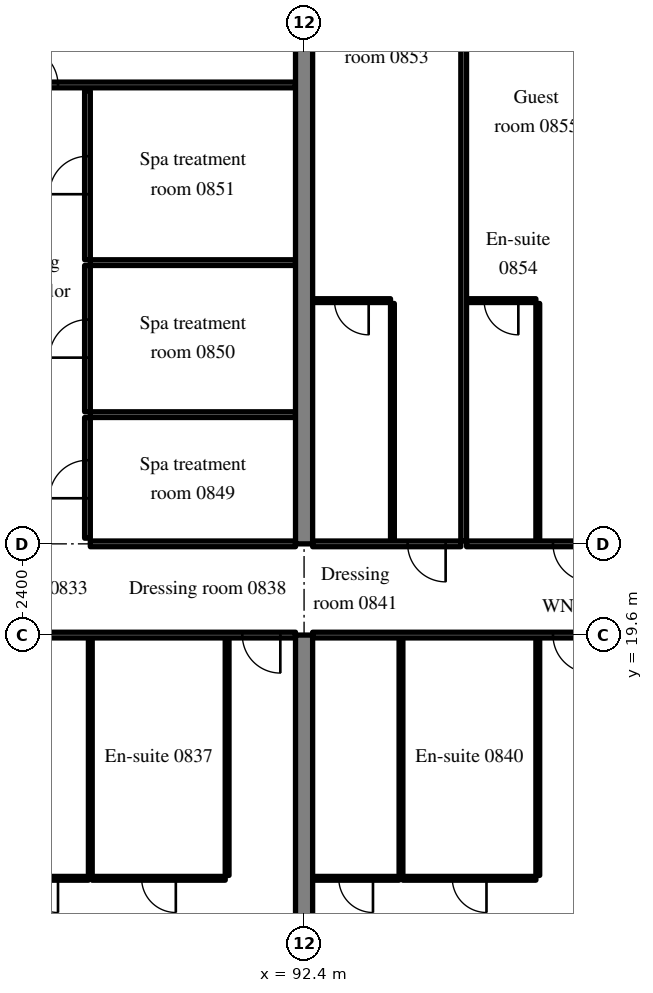
"""IFC4 building model, lengths in metres.
Left out: names, types, materials, properties, quantities, classifications, styles, units other than length and angle.
Written with IfcOpenShell. Run it as: python <this file> out.ifc"""

import sys

from ifc_helpers import new_model, si_unit, direction, frame, frame_2d, origin, place, context, subcontext, project, spatial, rectangle, extrude, source, transform, mapped, element, fill, save


model = new_model("IFC4")
c1 = context("Model", 3, precision=1e-05, world=origin(), true_north=direction((0.0, 1.0)))
c2 = subcontext(c1, "Body", "Model", "MODEL_VIEW")
j1 = project(units=[si_unit("LENGTHUNIT", "METRE"), si_unit("PLANEANGLEUNIT", "RADIAN")], contexts=[c1])
p1 = place(None, origin())
s1 = spatial("IfcSite", under=j1, at=p1, CompositionType="ELEMENT")
p2 = place(p1, origin())
s2 = spatial("IfcBuilding", under=s1, at=p2, CompositionType="ELEMENT")
p3 = place(p2, frame((0.0, 0.0, 39.2)))
s3 = spatial("IfcBuildingStorey", under=s2, at=p3, CompositionType="ELEMENT", Elevation=39.2)
m1 = source(origin(), c2, "Body", "SweptSolid", [
    extrude(rectangle(XDim=19.6, YDim=0.45, at=frame_2d((9.8, 0.0))), origin(), (0.0, 0.0, 1.0), 3.52),
])
p4 = place(p3, frame((92.4, 0.0, 0.0), z_axis=(0.0, 0.0, 1.0), x_axis=(0.0, 1.0, 0.0)))
e1 = element("IfcWall", 1, at=p4, inside=s3, PredefinedType="SHEAR", context=c2, shape_type="MappedRepresentation", body=[
    mapped(m1, transform((0.0, 0.0, 0.0), scale=1.0)),
])
m2 = source(origin(), c2, "Body", "SweptSolid", [
    extrude(rectangle(XDim=20.0, YDim=0.45, at=frame_2d((10.0, 0.0))), origin(), (0.0, 0.0, 1.0), 3.52),
])
p5 = place(p3, frame((92.4, 22.0, 0.0), z_axis=(0.0, 0.0, 1.0), x_axis=(0.0, 1.0, 0.0)))
e2 = element("IfcWall", 2, at=p5, inside=s3, PredefinedType="SHEAR", context=c2, shape_type="MappedRepresentation", body=[
    mapped(m2, transform((0.0, 0.0, 0.0), scale=1.0)),
])
m3 = source(origin(), c2, "Body", "SweptSolid", [
    extrude(rectangle(XDim=6.25, YDim=0.1, at=frame_2d((3.125, 0.0))), origin(), (0.0, 0.0, 1.0), 3.52),
])
for number, where, z_axis, x_axis in (
    (3, (90.375, 13.275, 0.0), (0.0, 0.0, 1.0), (0.0, 1.0, 0.0)),
    (4, (86.775, 13.275, 0.0), (0.0, 0.0, 1.0), (0.0, 1.0, 0.0)),
):
    element("IfcWall", number, at=place(p3, frame(where, z_axis=z_axis, x_axis=x_axis)), inside=s3, PredefinedType="PARTITIONING", context=c2, shape_type="MappedRepresentation", body=[
        mapped(m3, transform((0.0, 0.0, 0.0), scale=1.0)),
    ])
m4 = source(origin(), c2, "Body", "SweptSolid", [
    extrude(rectangle(XDim=3.5, YDim=0.1, at=frame_2d((1.75, 0.0))), origin(), (0.0, 0.0, 1.0), 3.52),
])
p6 = place(p3, frame((86.825, 13.2, 0.0), z_axis=(0.0, 0.0, 1.0), x_axis=(1.0, 0.0, 0.0)))
e5 = element("IfcWall", 5, at=p6, inside=s3, PredefinedType="PARTITIONING", context=c2, shape_type="MappedRepresentation", body=[
    mapped(m4, transform((0.0, 0.0, 0.0), scale=1.0)),
])
m5 = source(origin(), c2, "Body", "SweptSolid", [
    extrude(rectangle(XDim=0.9, YDim=2.1, at=frame_2d((0.45, 1.05))), frame((0.0, 0.06, 0.0), z_axis=(0.0, -1.0, 0.0), x_axis=(1.0, 0.0, 0.0)), (0.0, 0.0, 1.0), 0.12),
])
p7 = place(p6, frame((1.3, 0.0, 0.0)))
e6 = element("IfcOpeningElement", 6, at=p7, cuts=e5, PredefinedType="OPENING", context=c2, shape_type="MappedRepresentation", body=[
    mapped(m5, transform((0.0, 0.0, 0.0), scale=1.0)),
])
m6 = source(origin(), c2, "Body", "SweptSolid", [
    extrude(rectangle(XDim=2.5, YDim=0.1, at=frame_2d((1.25, 0.0))), origin(), (0.0, 0.0, 1.0), 3.52),
])
p8 = place(p3, frame((84.225, 13.2, 0.0), z_axis=(0.0, 0.0, 1.0), x_axis=(1.0, 0.0, 0.0)))
e7 = element("IfcWall", 7, at=p8, inside=s3, PredefinedType="PARTITIONING", context=c2, shape_type="MappedRepresentation", body=[
    mapped(m6, transform((0.0, 0.0, 0.0), scale=1.0)),
])
p9 = place(p8, frame((0.8, 0.0, 0.0)))
e8 = element("IfcOpeningElement", 8, at=p9, cuts=e7, PredefinedType="OPENING", context=c2, shape_type="MappedRepresentation", body=[
    mapped(m5, transform((0.0, 0.0, 0.0), scale=1.0)),
])
m7 = source(origin(), c2, "Body", "SweptSolid", [
    extrude(rectangle(XDim=7.95, YDim=0.15, at=frame_2d((3.975, 0.0))), origin(), (0.0, 0.0, 1.0), 2.82),
])
p10 = place(p3, frame((84.225, 19.6, 0.0), z_axis=(0.0, 0.0, 1.0), x_axis=(1.0, 0.0, 0.0)))
e9 = element("IfcWall", 9, at=p10, inside=s3, PredefinedType="PARTITIONING", context=c2, shape_type="MappedRepresentation", body=[
    mapped(m7, transform((0.0, 0.0, 0.0), scale=1.0)),
])
m8 = source(origin(), c2, "Body", "SweptSolid", [
    extrude(rectangle(XDim=1.0, YDim=2.1, at=frame_2d((0.5, 1.05))), frame((0.0, 0.085, 0.0), z_axis=(0.0, -1.0, 0.0), x_axis=(1.0, 0.0, 0.0)), (0.0, 0.0, 1.0), 0.17),
])
p11 = place(p10, frame((6.55, 0.0, 0.0)))
e10 = element("IfcOpeningElement", 10, at=p11, cuts=e9, PredefinedType="OPENING", context=c2, shape_type="MappedRepresentation", body=[
    mapped(m8, transform((0.0, 0.0, 0.0), scale=1.0)),
])
for number, where, z_axis, x_axis in (
    (11, (98.55, 13.275, 0.0), (0.0, 0.0, 1.0), (0.0, 1.0, 0.0)),
    (12, (94.95, 13.275, 0.0), (0.0, 0.0, 1.0), (0.0, 1.0, 0.0)),
):
    element("IfcWall", number, at=place(p3, frame(where, z_axis=z_axis, x_axis=x_axis)), inside=s3, PredefinedType="PARTITIONING", context=c2, shape_type="MappedRepresentation", body=[
        mapped(m3, transform((0.0, 0.0, 0.0), scale=1.0)),
    ])
p12 = place(p3, frame((95.0, 13.2, 0.0), z_axis=(0.0, 0.0, 1.0), x_axis=(1.0, 0.0, 0.0)))
e13 = element("IfcWall", 13, at=p12, inside=s3, PredefinedType="PARTITIONING", context=c2, shape_type="MappedRepresentation", body=[
    mapped(m4, transform((0.0, 0.0, 0.0), scale=1.0)),
])
p13 = place(p12, frame((1.3, 0.0, 0.0)))
e14 = element("IfcOpeningElement", 14, at=p13, cuts=e13, PredefinedType="OPENING", context=c2, shape_type="MappedRepresentation", body=[
    mapped(m5, transform((0.0, 0.0, 0.0), scale=1.0)),
])
m9 = source(origin(), c2, "Body", "SweptSolid", [
    extrude(rectangle(XDim=2.275, YDim=0.1, at=frame_2d((1.137, 0.0))), origin(), (0.0, 0.0, 1.0), 3.52),
])
p14 = place(p3, frame((92.625, 13.2, 0.0), z_axis=(0.0, 0.0, 1.0), x_axis=(1.0, 0.0, 0.0)))
e15 = element("IfcWall", 15, at=p14, inside=s3, PredefinedType="PARTITIONING", context=c2, shape_type="MappedRepresentation", body=[
    mapped(m9, transform((0.0, 0.0, 0.0), scale=1.0)),
])
p15 = place(p14, frame((0.688, 0.0, 0.0)))
e16 = element("IfcOpeningElement", 16, at=p15, cuts=e15, PredefinedType="OPENING", context=c2, shape_type="MappedRepresentation", body=[
    mapped(m5, transform((0.0, 0.0, 0.0), scale=1.0)),
])
m10 = source(origin(), c2, "Body", "SweptSolid", [
    extrude(rectangle(XDim=7.725, YDim=0.15, at=frame_2d((3.863, 0.0))), origin(), (0.0, 0.0, 1.0), 2.82),
])
p16 = place(p3, frame((92.625, 19.6, 0.0), z_axis=(0.0, 0.0, 1.0), x_axis=(1.0, 0.0, 0.0)))
e17 = element("IfcWall", 17, at=p16, inside=s3, PredefinedType="PARTITIONING", context=c2, shape_type="MappedRepresentation", body=[
    mapped(m10, transform((0.0, 0.0, 0.0), scale=1.0)),
])
p17 = place(p16, frame((6.325, 0.0, 0.0)))
e18 = element("IfcOpeningElement", 18, at=p17, cuts=e17, PredefinedType="OPENING", context=c2, shape_type="MappedRepresentation", body=[
    mapped(m8, transform((0.0, 0.0, 0.0), scale=1.0)),
])
m11 = source(origin(), c2, "Body", "SweptSolid", [
    extrude(rectangle(XDim=5.4, YDim=0.15, at=frame_2d((2.7, 0.0))), origin(), (0.0, 0.0, 1.0), 2.82),
])
p18 = place(p3, frame((86.775, 22.0, 0.0), z_axis=(0.0, 0.0, 1.0), x_axis=(1.0, 0.0, 0.0)))
e19 = element("IfcWall", 19, at=p18, inside=s3, PredefinedType="PARTITIONING", context=c2, shape_type="MappedRepresentation", body=[
    mapped(m11, transform((0.0, 0.0, 0.0), scale=1.0)),
])
m12 = source(origin(), c2, "Body", "SweptSolid", [
    extrude(rectangle(XDim=3.175, YDim=0.15, at=frame_2d((1.587, 0.0))), origin(), (0.0, 0.0, 1.0), 3.52),
])
p19 = place(p3, frame((86.7, 22.15, 0.0), z_axis=(0.0, 0.0, 1.0), x_axis=(0.0, 1.0, 0.0)))
e20 = element("IfcWall", 20, at=p19, inside=s3, PredefinedType="PARTITIONING", context=c2, shape_type="MappedRepresentation", body=[
    mapped(m12, transform((0.0, 0.0, 0.0), scale=1.0)),
])
p20 = place(p19, frame((1.05, 0.0, 0.0)))
e21 = element("IfcOpeningElement", 21, at=p20, cuts=e20, PredefinedType="OPENING", context=c2, shape_type="MappedRepresentation", body=[
    mapped(m8, transform((0.0, 0.0, 0.0), scale=1.0)),
])
m13 = source(origin(), c2, "Body", "SweptSolid", [
    extrude(rectangle(XDim=5.4, YDim=0.15, at=frame_2d((2.7, 0.0))), origin(), (0.0, 0.0, 1.0), 3.52),
])
p21 = place(p3, frame((86.775, 25.4, 0.0), z_axis=(0.0, 0.0, 1.0), x_axis=(1.0, 0.0, 0.0)))
e22 = element("IfcWall", 22, at=p21, inside=s3, PredefinedType="PARTITIONING", context=c2, shape_type="MappedRepresentation", body=[
    mapped(m13, transform((0.0, 0.0, 0.0), scale=1.0)),
])
m14 = source(origin(), c2, "Body", "SweptSolid", [
    extrude(rectangle(XDim=3.85, YDim=0.15, at=frame_2d((1.925, 0.0))), origin(), (0.0, 0.0, 1.0), 3.52),
])
p22 = place(p3, frame((86.7, 25.475, 0.0), z_axis=(0.0, 0.0, 1.0), x_axis=(0.0, 1.0, 0.0)))
e23 = element("IfcWall", 23, at=p22, inside=s3, PredefinedType="PARTITIONING", context=c2, shape_type="MappedRepresentation", body=[
    mapped(m14, transform((0.0, 0.0, 0.0), scale=1.0)),
])
p23 = place(p22, frame((1.425, 0.0, 0.0)))
e24 = element("IfcOpeningElement", 24, at=p23, cuts=e23, PredefinedType="OPENING", context=c2, shape_type="MappedRepresentation", body=[
    mapped(m8, transform((0.0, 0.0, 0.0), scale=1.0)),
])
p24 = place(p3, frame((86.775, 29.4, 0.0), z_axis=(0.0, 0.0, 1.0), x_axis=(1.0, 0.0, 0.0)))
e25 = element("IfcWall", 25, at=p24, inside=s3, PredefinedType="PARTITIONING", context=c2, shape_type="MappedRepresentation", body=[
    mapped(m13, transform((0.0, 0.0, 0.0), scale=1.0)),
])
m15 = source(origin(), c2, "Body", "SweptSolid", [
    extrude(rectangle(XDim=4.45, YDim=0.15, at=frame_2d((2.225, 0.0))), origin(), (0.0, 0.0, 1.0), 3.52),
])
p25 = place(p3, frame((86.7, 29.475, 0.0), z_axis=(0.0, 0.0, 1.0), x_axis=(0.0, 1.0, 0.0)))
e26 = element("IfcWall", 26, at=p25, inside=s3, PredefinedType="PARTITIONING", context=c2, shape_type="MappedRepresentation", body=[
    mapped(m15, transform((0.0, 0.0, 0.0), scale=1.0)),
])
p26 = place(p25, frame((1.725, 0.0, 0.0)))
e27 = element("IfcOpeningElement", 27, at=p26, cuts=e26, PredefinedType="OPENING", context=c2, shape_type="MappedRepresentation", body=[
    mapped(m8, transform((0.0, 0.0, 0.0), scale=1.0)),
])
m16 = source(origin(), c2, "Body", "SweptSolid", [
    extrude(rectangle(XDim=7.95, YDim=0.15, at=frame_2d((3.975, 0.0))), origin(), (0.0, 0.0, 1.0), 3.52),
])
p27 = place(p3, frame((84.225, 34.075, 0.0), z_axis=(0.0, 0.0, 1.0), x_axis=(1.0, 0.0, 0.0)))
e28 = element("IfcWall", 28, at=p27, inside=s3, PredefinedType="PARTITIONING", context=c2, shape_type="MappedRepresentation", body=[
    mapped(m16, transform((0.0, 0.0, 0.0), scale=1.0)),
])
p28 = place(p27, frame((0.7, 0.0, 0.0)))
e29 = element("IfcOpeningElement", 29, at=p28, cuts=e28, PredefinedType="OPENING", context=c2, shape_type="MappedRepresentation", body=[
    mapped(m8, transform((0.0, 0.0, 0.0), scale=1.0)),
])
p29 = place(p3, frame((94.725, 22.075, 0.0), z_axis=(0.0, 0.0, 1.0), x_axis=(0.0, 1.0, 0.0)))
e30 = element("IfcWall", 30, at=p29, inside=s3, PredefinedType="PARTITIONING", context=c2, shape_type="MappedRepresentation", body=[
    mapped(m3, transform((0.0, 0.0, 0.0), scale=1.0)),
])
m17 = source(origin(), c2, "Body", "SweptSolid", [
    extrude(rectangle(XDim=2.05, YDim=0.1, at=frame_2d((1.025, 0.0))), origin(), (0.0, 0.0, 1.0), 3.52),
])
p30 = place(p3, frame((92.625, 28.4, 0.0), z_axis=(0.0, 0.0, 1.0), x_axis=(1.0, 0.0, 0.0)))
e31 = element("IfcWall", 31, at=p30, inside=s3, PredefinedType="PARTITIONING", context=c2, shape_type="MappedRepresentation", body=[
    mapped(m17, transform((0.0, 0.0, 0.0), scale=1.0)),
])
p31 = place(p30, frame((0.575, 0.0, 0.0)))
e32 = element("IfcOpeningElement", 32, at=p31, cuts=e31, PredefinedType="OPENING", context=c2, shape_type="MappedRepresentation", body=[
    mapped(m5, transform((0.0, 0.0, 0.0), scale=1.0)),
])
m18 = source(origin(), c2, "Body", "SweptSolid", [
    extrude(rectangle(XDim=3.9, YDim=0.15, at=frame_2d((1.95, 0.0))), origin(), (0.0, 0.0, 1.0), 2.82),
])
p32 = place(p3, frame((92.625, 22.0, 0.0), z_axis=(0.0, 0.0, 1.0), x_axis=(1.0, 0.0, 0.0)))
e33 = element("IfcWall", 33, at=p32, inside=s3, PredefinedType="PARTITIONING", context=c2, shape_type="MappedRepresentation", body=[
    mapped(m18, transform((0.0, 0.0, 0.0), scale=1.0)),
])
p33 = place(p32, frame((2.5, 0.0, 0.0)))
e34 = element("IfcOpeningElement", 34, at=p33, cuts=e33, PredefinedType="OPENING", context=c2, shape_type="MappedRepresentation", body=[
    mapped(m8, transform((0.0, 0.0, 0.0), scale=1.0)),
])
p34 = place(p3, frame((98.55, 22.075, 0.0), z_axis=(0.0, 0.0, 1.0), x_axis=(0.0, 1.0, 0.0)))
e35 = element("IfcWall", 35, at=p34, inside=s3, PredefinedType="PARTITIONING", context=c2, shape_type="MappedRepresentation", body=[
    mapped(m3, transform((0.0, 0.0, 0.0), scale=1.0)),
])
m19 = source(origin(), c2, "Body", "SweptSolid", [
    extrude(rectangle(XDim=1.825, YDim=0.1, at=frame_2d((0.913, 0.0))), origin(), (0.0, 0.0, 1.0), 3.52),
])
p35 = place(p3, frame((96.675, 28.4, 0.0), z_axis=(0.0, 0.0, 1.0), x_axis=(1.0, 0.0, 0.0)))
e36 = element("IfcWall", 36, at=p35, inside=s3, PredefinedType="PARTITIONING", context=c2, shape_type="MappedRepresentation", body=[
    mapped(m19, transform((0.0, 0.0, 0.0), scale=1.0)),
])
p36 = place(p35, frame((0.463, 0.0, 0.0)))
e37 = element("IfcOpeningElement", 37, at=p36, cuts=e36, PredefinedType="OPENING", context=c2, shape_type="MappedRepresentation", body=[
    mapped(m5, transform((0.0, 0.0, 0.0), scale=1.0)),
])
m20 = source(origin(), c2, "Body", "SweptSolid", [
    extrude(rectangle(XDim=3.675, YDim=0.15, at=frame_2d((1.837, 0.0))), origin(), (0.0, 0.0, 1.0), 2.82),
])
p37 = place(p3, frame((96.675, 22.0, 0.0), z_axis=(0.0, 0.0, 1.0), x_axis=(1.0, 0.0, 0.0)))
e38 = element("IfcWall", 38, at=p37, inside=s3, PredefinedType="PARTITIONING", context=c2, shape_type="MappedRepresentation", body=[
    mapped(m20, transform((0.0, 0.0, 0.0), scale=1.0)),
])
p38 = place(p37, frame((2.275, 0.0, 0.0)))
e39 = element("IfcOpeningElement", 39, at=p38, cuts=e38, PredefinedType="OPENING", context=c2, shape_type="MappedRepresentation", body=[
    mapped(m8, transform((0.0, 0.0, 0.0), scale=1.0)),
])
m21 = source(origin(), c2, "Body", "SweptSolid", [
    extrude(rectangle(XDim=19.347, YDim=0.15, at=frame_2d((9.674, 0.0))), origin(), (0.0, 0.0, 1.0), 3.52),
])
p39 = place(p3, frame((96.6, 22.075, 0.0), z_axis=(0.0, 0.0, 1.0), x_axis=(0.0, 1.0, 0.0)))
e40 = element("IfcWall", 40, at=p39, inside=s3, PredefinedType="PARTITIONING", context=c2, shape_type="MappedRepresentation", body=[
    mapped(m21, transform((0.0, 0.0, 0.0), scale=1.0)),
])
m22 = source(origin(), c2, "Body", "SweptSolid", [
    extrude(rectangle(XDim=0.9, YDim=2.1, at=frame_2d((0.45, 1.05))), frame((0.0, 0.025, 0.0), z_axis=(0.0, -1.0, 0.0), x_axis=(1.0, 0.0, 0.0)), (0.0, 0.0, 1.0), 0.05),
])
p40 = place(p7, origin())
e41 = element("IfcDoor", 41, at=p40, inside=s3, OperationType="SINGLE_SWING_RIGHT", PredefinedType="DOOR", context=c2, shape_type="MappedRepresentation", body=[
    mapped(m22, transform((0.0, 0.0, 0.0), scale=1.0)),
])
fill(e6, e41)
p41 = place(p9, origin())
e42 = element("IfcDoor", 42, at=p41, inside=s3, OperationType="SINGLE_SWING_RIGHT", PredefinedType="DOOR", context=c2, shape_type="MappedRepresentation", body=[
    mapped(m22, transform((0.0, 0.0, 0.0), scale=1.0)),
])
fill(e8, e42)
m23 = source(origin(), c2, "Body", "SweptSolid", [
    extrude(rectangle(XDim=1.0, YDim=2.1, at=frame_2d((0.5, 1.05))), frame((0.0, 0.025, 0.0), z_axis=(0.0, -1.0, 0.0), x_axis=(1.0, 0.0, 0.0)), (0.0, 0.0, 1.0), 0.05),
])
p42 = place(p11, origin())
e43 = element("IfcDoor", 43, at=p42, inside=s3, OperationType="SINGLE_SWING_RIGHT", PredefinedType="DOOR", context=c2, shape_type="MappedRepresentation", body=[
    mapped(m23, transform((0.0, 0.0, 0.0), scale=1.0)),
])
fill(e10, e43)
p43 = place(p13, origin())
e44 = element("IfcDoor", 44, at=p43, inside=s3, OperationType="SINGLE_SWING_RIGHT", PredefinedType="DOOR", context=c2, shape_type="MappedRepresentation", body=[
    mapped(m22, transform((0.0, 0.0, 0.0), scale=1.0)),
])
fill(e14, e44)
p44 = place(p15, origin())
e45 = element("IfcDoor", 45, at=p44, inside=s3, OperationType="SINGLE_SWING_RIGHT", PredefinedType="DOOR", context=c2, shape_type="MappedRepresentation", body=[
    mapped(m22, transform((0.0, 0.0, 0.0), scale=1.0)),
])
fill(e16, e45)
p45 = place(p17, origin())
e46 = element("IfcDoor", 46, at=p45, inside=s3, OperationType="SINGLE_SWING_RIGHT", PredefinedType="DOOR", context=c2, shape_type="MappedRepresentation", body=[
    mapped(m23, transform((0.0, 0.0, 0.0), scale=1.0)),
])
fill(e18, e46)
p46 = place(p20, origin())
e47 = element("IfcDoor", 47, at=p46, inside=s3, OperationType="SINGLE_SWING_LEFT", PredefinedType="DOOR", context=c2, shape_type="MappedRepresentation", body=[
    mapped(m23, transform((0.0, 0.0, 0.0), scale=1.0)),
])
fill(e21, e47)
p47 = place(p23, origin())
e48 = element("IfcDoor", 48, at=p47, inside=s3, OperationType="SINGLE_SWING_LEFT", PredefinedType="DOOR", context=c2, shape_type="MappedRepresentation", body=[
    mapped(m23, transform((0.0, 0.0, 0.0), scale=1.0)),
])
fill(e24, e48)
p48 = place(p26, origin())
e49 = element("IfcDoor", 49, at=p48, inside=s3, OperationType="SINGLE_SWING_LEFT", PredefinedType="DOOR", context=c2, shape_type="MappedRepresentation", body=[
    mapped(m23, transform((0.0, 0.0, 0.0), scale=1.0)),
])
fill(e27, e49)
p49 = place(p28, origin())
e50 = element("IfcDoor", 50, at=p49, inside=s3, OperationType="SINGLE_SWING_LEFT", PredefinedType="DOOR", context=c2, shape_type="MappedRepresentation", body=[
    mapped(m23, transform((0.0, 0.0, 0.0), scale=1.0)),
])
fill(e29, e50)
p50 = place(p31, origin())
e51 = element("IfcDoor", 51, at=p50, inside=s3, OperationType="SINGLE_SWING_RIGHT", PredefinedType="DOOR", context=c2, shape_type="MappedRepresentation", body=[
    mapped(m22, transform((0.0, 0.0, 0.0), scale=1.0)),
])
fill(e32, e51)
p51 = place(p33, origin())
e52 = element("IfcDoor", 52, at=p51, inside=s3, OperationType="SINGLE_SWING_RIGHT", PredefinedType="DOOR", context=c2, shape_type="MappedRepresentation", body=[
    mapped(m23, transform((0.0, 0.0, 0.0), scale=1.0)),
])
fill(e34, e52)
p52 = place(p36, origin())
e53 = element("IfcDoor", 53, at=p52, inside=s3, OperationType="SINGLE_SWING_RIGHT", PredefinedType="DOOR", context=c2, shape_type="MappedRepresentation", body=[
    mapped(m22, transform((0.0, 0.0, 0.0), scale=1.0)),
])
fill(e37, e53)
p53 = place(p38, origin())
e54 = element("IfcDoor", 54, at=p53, inside=s3, OperationType="SINGLE_SWING_RIGHT", PredefinedType="DOOR", context=c2, shape_type="MappedRepresentation", body=[
    mapped(m23, transform((0.0, 0.0, 0.0), scale=1.0)),
])
fill(e39, e54)
save(model, sys.argv[1])
